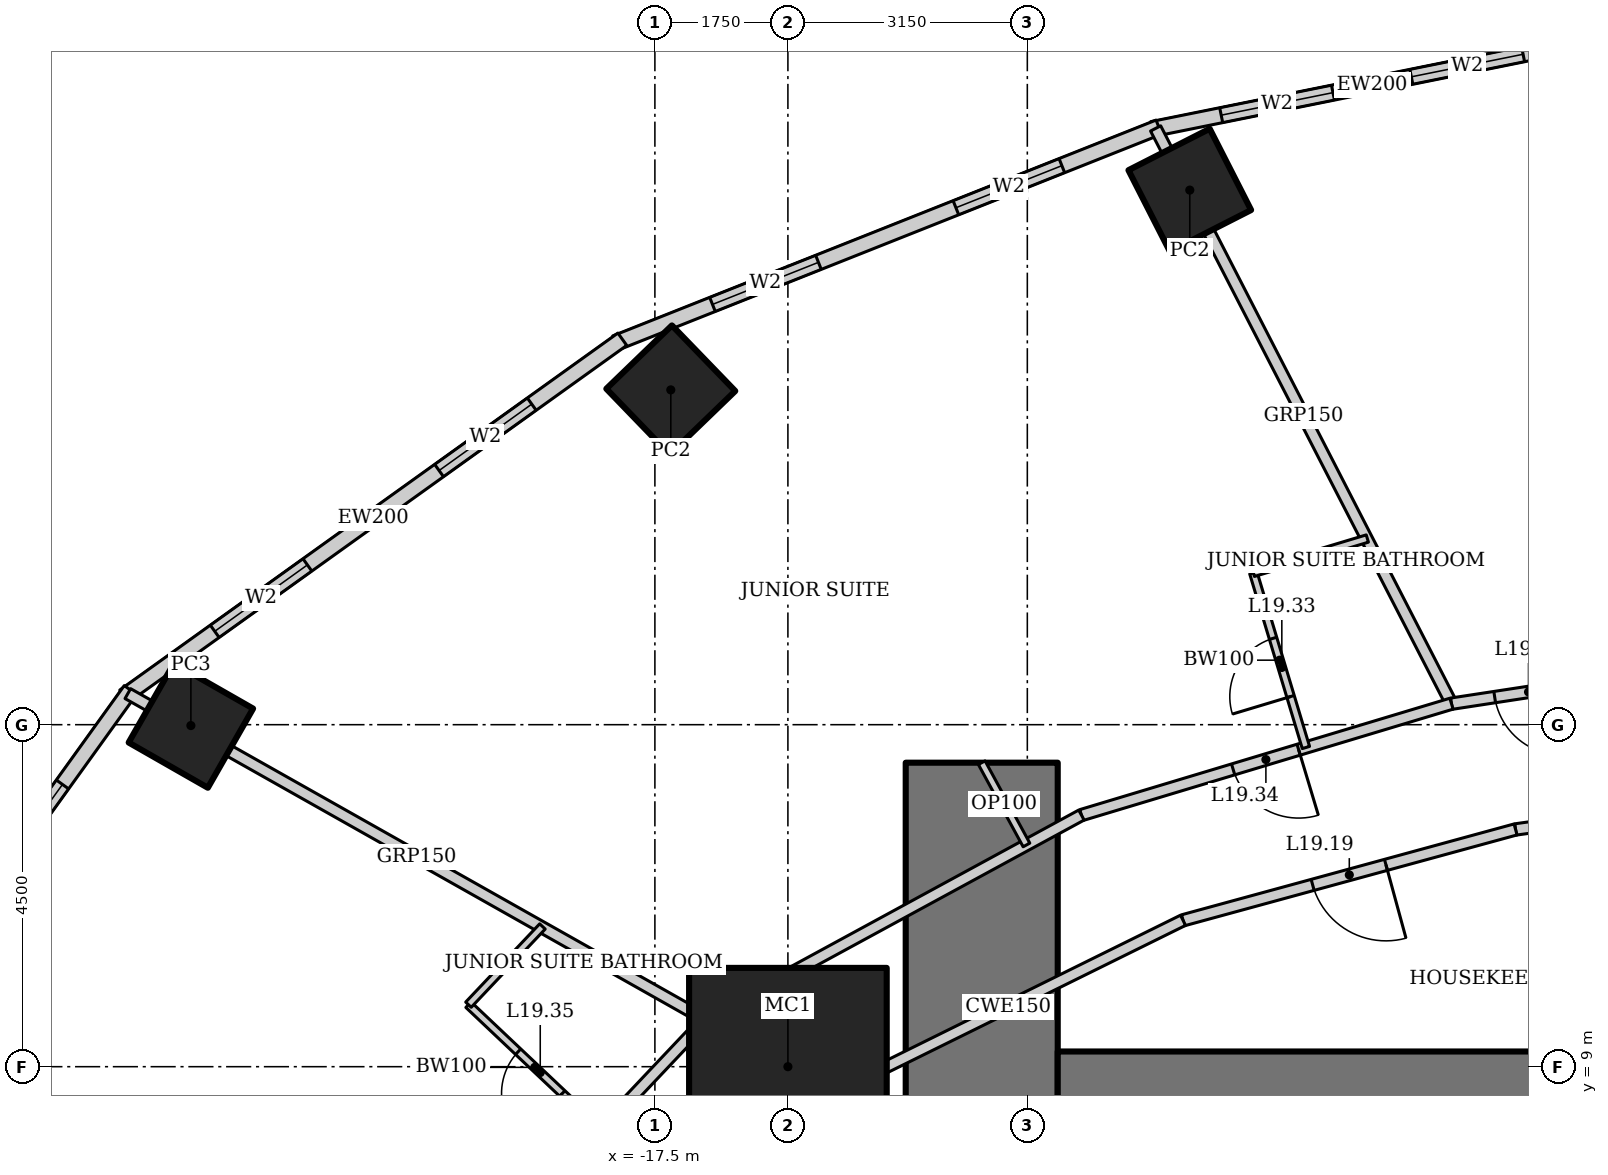
"""IFC4 building model, lengths in metres.
Left out: names, types, materials, properties, quantities, classifications, styles, units other than length and angle.
Written with IfcOpenShell. Run it as: python <this file> out.ifc"""

import sys

from ifc_helpers import new_model, si_unit, direction, frame, frame_2d, origin, origin_2d, place, context, subcontext, project, spatial, rectangle, hollow_rectangle, extrude, element, fill, save


model = new_model("IFC4")
c1 = context("Model", 3, precision=1e-05, world=origin(), true_north=direction((0.0, 1.0)))
c2 = subcontext(c1, "Body", "Model", "MODEL_VIEW")
j1 = project(units=[si_unit("LENGTHUNIT", "METRE"), si_unit("PLANEANGLEUNIT", "RADIAN")], contexts=[c1])
p1 = place(None, origin())
s1 = spatial("IfcSite", under=j1, at=p1, CompositionType="ELEMENT")
p2 = place(p1, origin())
s2 = spatial("IfcBuilding", under=s1, at=p2, CompositionType="ELEMENT")
p3 = place(p2, frame((0.0, 0.0, 83.8)))
s3 = spatial("IfcBuildingStorey", under=s2, at=p3, CompositionType="ELEMENT", Elevation=83.8)
p4 = place(p3, frame((-15.75, 9.0, 0.0), z_axis=(0.0, 0.0, 1.0), x_axis=(1.0, 0.0, 0.0)))
e1 = element("IfcColumn", 1, at=p4, inside=s3, PredefinedType="COLUMN", context=c2, shape_type="SweptSolid", body=[
    extrude(hollow_rectangle(XDim=2.6, YDim=2.6, WallThickness=0.13, at=origin_2d()), origin(), (0.0, 0.0, 1.0), 3.6),
])
for number, where, z_axis, x_axis in (
    (2, (-10.463, 20.534, 0.0), (0.0, 0.0, 1.0), (0.891, 0.454, 0.0)),
    (3, (-17.291, 17.905, 0.0), (0.0, 0.0, 1.0), (0.719, 0.695, 0.0)),
):
    element("IfcColumn", number, at=place(p3, frame(where, z_axis=z_axis, x_axis=x_axis)), inside=s3, PredefinedType="COLUMN", context=c2, shape_type="SweptSolid", body=[
        extrude(hollow_rectangle(XDim=1.2, YDim=1.2, WallThickness=0.1, at=origin_2d()), origin(), (0.0, 0.0, 1.0), 3.6),
    ])
p5 = place(p3, frame((-23.605, 13.489, 0.0), z_axis=(0.0, 0.0, 1.0), x_axis=(0.496139221777, 0.86824298017, 0.0)))
e4 = element("IfcColumn", 4, at=p5, inside=s3, PredefinedType="COLUMN", context=c2, shape_type="SweptSolid", body=[
    extrude(hollow_rectangle(XDim=1.2, YDim=1.2, WallThickness=0.12, at=origin_2d()), origin(), (0.0, 0.0, 1.0), 3.6),
])
p6 = place(p3, frame((-13.2, 13.0, 0.0), z_axis=(0.0, 0.0, 1.0), x_axis=(0.0, -1.0, 0.0)))
e5 = element("IfcWall", 5, at=p6, inside=s3, PredefinedType="SHEAR", context=c2, shape_type="SweptSolid", body=[
    extrude(rectangle(XDim=26.0, YDim=2.0, at=frame_2d((13.0, 0.0))), origin(), (0.0, 0.0, 1.0), 3.6),
])
p7 = place(p6, frame((12.1, 0.0, 0.0)))
e6 = element("IfcOpeningElement", 6, at=p7, cuts=e5, PredefinedType="OPENING", context=c2, shape_type="SweptSolid", body=[
    extrude(rectangle(XDim=1.8, YDim=2.1, at=frame_2d((0.9, 1.05))), frame((0.0, 1.01, 0.0), z_axis=(0.0, -1.0, 0.0), x_axis=(1.0, 0.0, 0.0)), (0.0, 0.0, 1.0), 2.02),
])
p8 = place(p3, frame((12.2, 8.0, 0.0), z_axis=(0.0, 0.0, 1.0), x_axis=(-1.0, 0.0, 0.0)))
e7 = element("IfcWall", 7, at=p8, inside=s3, PredefinedType="SHEAR", context=c2, shape_type="SweptSolid", body=[
    extrude(rectangle(XDim=24.4, YDim=2.4, at=frame_2d((12.2, 0.0))), origin(), (0.0, 0.0, 1.0), 3.6),
])
p9 = place(p3, frame((-5.17, 22.504, 0.0), z_axis=(0.0, 0.0, 1.0), x_axis=(-0.980251657452, -0.197754110105, 0.0)))
e8 = element("IfcWall", 8, at=p9, inside=s3, PredefinedType="SOLIDWALL", context=c2, shape_type="SweptSolid", body=[
    extrude(rectangle(XDim=5.904, YDim=0.2, at=frame_2d((2.952, 0.0))), origin(), (0.0, 0.0, 1.0), 3.45),
])
p10 = place(p9, frame((0.926, 0.0, 0.5)))
e9 = element("IfcOpeningElement", 9, at=p10, cuts=e8, PredefinedType="OPENING", context=c2, shape_type="SweptSolid", body=[
    extrude(rectangle(XDim=1.5, YDim=2.2, at=frame_2d((0.75, 1.1))), frame((0.0, 0.11, 0.0), z_axis=(0.0, -1.0, 0.0), x_axis=(1.0, 0.0, 0.0)), (0.0, 0.0, 1.0), 0.22),
])
p11 = place(p9, frame((3.478, 0.0, 0.5)))
e10 = element("IfcOpeningElement", 10, at=p11, cuts=e8, PredefinedType="OPENING", context=c2, shape_type="SweptSolid", body=[
    extrude(rectangle(XDim=1.5, YDim=2.2, at=frame_2d((0.75, 1.1))), frame((0.0, 0.11, 0.0), z_axis=(0.0, -1.0, 0.0), x_axis=(1.0, 0.0, 0.0)), (0.0, 0.0, 1.0), 0.22),
])
p12 = place(p3, frame((-10.869, 21.363, 0.0), z_axis=(0.0, 0.0, 1.0), x_axis=(-0.929358351251, -0.369178892895, 0.0)))
e11 = element("IfcWall", 11, at=p12, inside=s3, PredefinedType="SOLIDWALL", context=c2, shape_type="SweptSolid", body=[
    extrude(rectangle(XDim=7.692, YDim=0.2, at=frame_2d((3.846, 0.0))), origin(), (0.0, 0.0, 1.0), 3.45),
])
p13 = place(p12, frame((1.373, 0.0, 0.5)))
e12 = element("IfcOpeningElement", 12, at=p13, cuts=e11, PredefinedType="OPENING", context=c2, shape_type="SweptSolid", body=[
    extrude(rectangle(XDim=1.5, YDim=2.2, at=frame_2d((0.75, 1.1))), frame((0.0, 0.11, 0.0), z_axis=(0.0, -1.0, 0.0), x_axis=(1.0, 0.0, 0.0)), (0.0, 0.0, 1.0), 0.22),
])
p14 = place(p12, frame((4.819, 0.0, 0.5)))
e13 = element("IfcOpeningElement", 13, at=p14, cuts=e11, PredefinedType="OPENING", context=c2, shape_type="SweptSolid", body=[
    extrude(rectangle(XDim=1.5, YDim=2.2, at=frame_2d((0.75, 1.1))), frame((0.0, 0.11, 0.0), z_axis=(0.0, -1.0, 0.0), x_axis=(1.0, 0.0, 0.0)), (0.0, 0.0, 1.0), 0.22),
])
p15 = place(p3, frame((-17.929, 18.572, 0.0), z_axis=(0.0, 0.0, 1.0), x_axis=(-0.812791321576, -0.582554948112, 0.0)))
e14 = element("IfcWall", 14, at=p15, inside=s3, PredefinedType="SOLIDWALL", context=c2, shape_type="SweptSolid", body=[
    extrude(rectangle(XDim=8.063, YDim=0.2, at=frame_2d((4.032, 0.0))), origin(), (0.0, 0.0, 1.0), 3.45),
])
p16 = place(p15, frame((1.466, 0.0, 0.5)))
e15 = element("IfcOpeningElement", 15, at=p16, cuts=e14, PredefinedType="OPENING", context=c2, shape_type="SweptSolid", body=[
    extrude(rectangle(XDim=1.5, YDim=2.2, at=frame_2d((0.75, 1.1))), frame((0.0, 0.11, 0.0), z_axis=(0.0, -1.0, 0.0), x_axis=(1.0, 0.0, 0.0)), (0.0, 0.0, 1.0), 0.22),
])
p17 = place(p15, frame((5.097, 0.0, 0.5)))
e16 = element("IfcOpeningElement", 16, at=p17, cuts=e14, PredefinedType="OPENING", context=c2, shape_type="SweptSolid", body=[
    extrude(rectangle(XDim=1.5, YDim=2.2, at=frame_2d((0.75, 1.1))), frame((0.0, 0.11, 0.0), z_axis=(0.0, -1.0, 0.0), x_axis=(1.0, 0.0, 0.0)), (0.0, 0.0, 1.0), 0.22),
])
p18 = place(p3, frame((-24.4, 13.957, 0.0), z_axis=(0.0, 0.0, 1.0), x_axis=(-0.583937613703, -0.811798536155, 0.0)))
e17 = element("IfcWall", 17, at=p18, inside=s3, PredefinedType="SOLIDWALL", context=c2, shape_type="SweptSolid", body=[
    extrude(rectangle(XDim=8.323, YDim=0.2, at=frame_2d((4.162, 0.0))), origin(), (0.0, 0.0, 1.0), 3.45),
])
p19 = place(p18, frame((1.531, 0.0, 0.5)))
e18 = element("IfcOpeningElement", 18, at=p19, cuts=e17, PredefinedType="OPENING", context=c2, shape_type="SweptSolid", body=[
    extrude(rectangle(XDim=1.5, YDim=2.2, at=frame_2d((0.75, 1.1))), frame((0.0, 0.11, 0.0), z_axis=(0.0, -1.0, 0.0), x_axis=(1.0, 0.0, 0.0)), (0.0, 0.0, 1.0), 0.22),
])
p20 = place(p18, frame((5.292, 0.0, 0.5)))
e19 = element("IfcOpeningElement", 19, at=p20, cuts=e17, PredefinedType="OPENING", context=c2, shape_type="SweptSolid", body=[
    extrude(rectangle(XDim=1.5, YDim=2.2, at=frame_2d((0.75, 1.1))), frame((0.0, 0.11, 0.0), z_axis=(0.0, -1.0, 0.0), x_axis=(1.0, 0.0, 0.0)), (0.0, 0.0, 1.0), 0.22),
])
p21 = place(p3, frame((-10.912, 21.346, 0.0), z_axis=(0.0, 0.0, 1.0), x_axis=(0.457327273085, -0.889298468059, 0.0)))
e20 = element("IfcWall", 20, at=p21, inside=s3, PredefinedType="PARTITIONING", context=c2, shape_type="SweptSolid", body=[
    extrude(rectangle(XDim=8.511, YDim=0.15, at=frame_2d((4.256, 0.0))), origin(), (0.0, 0.0, 1.0), 2.528),
])
p22 = place(p3, frame((-24.435, 13.909, 0.0), z_axis=(0.0, 0.0, 1.0), x_axis=(0.87090601027, -0.491449612143, 0.0)))
e21 = element("IfcWall", 21, at=p22, inside=s3, PredefinedType="PARTITIONING", context=c2, shape_type="SweptSolid", body=[
    extrude(rectangle(XDim=8.726, YDim=0.15, at=frame_2d((4.363, 0.0))), origin(), (0.0, 0.0, 1.0), 2.693),
])
p23 = place(p3, frame((-3.311, 14.342, 0.0), z_axis=(0.0, 0.0, 1.0), x_axis=(-0.988564270062, -0.150800145746, 0.0)))
e22 = element("IfcWall", 22, at=p23, inside=s3, PredefinedType="PARTITIONING", context=c2, shape_type="SweptSolid", body=[
    extrude(rectangle(XDim=3.751, YDim=0.15, at=frame_2d((1.875, 0.0))), origin(), (0.0, 0.0, 1.0), 3.45),
])
p24 = place(p23, frame((2.276, 0.0, 0.0)))
e23 = element("IfcOpeningElement", 23, at=p24, cuts=e22, PredefinedType="OPENING", context=c2, shape_type="SweptSolid", body=[
    extrude(rectangle(XDim=0.9, YDim=2.1, at=frame_2d((0.45, 1.05))), frame((0.0, 0.085, 0.0), z_axis=(0.0, -1.0, 0.0), x_axis=(1.0, 0.0, 0.0)), (0.0, 0.0, 1.0), 0.17),
])
p25 = place(p3, frame((-7.019, 13.776, 0.0), z_axis=(0.0, 0.0, 1.0), x_axis=(-0.957564241242, -0.288219922793, 0.0)))
e24 = element("IfcWall", 24, at=p25, inside=s3, PredefinedType="PARTITIONING", context=c2, shape_type="SweptSolid", body=[
    extrude(rectangle(XDim=5.085, YDim=0.15, at=frame_2d((2.542, 0.0))), origin(), (0.0, 0.0, 1.0), 3.45),
])
p26 = place(p25, frame((2.1, 0.0, 0.0)))
e25 = element("IfcOpeningElement", 25, at=p26, cuts=e24, PredefinedType="OPENING", context=c2, shape_type="SweptSolid", body=[
    extrude(rectangle(XDim=0.9, YDim=2.1, at=frame_2d((0.45, 1.05))), frame((0.0, 0.085, 0.0), z_axis=(0.0, -1.0, 0.0), x_axis=(1.0, 0.0, 0.0)), (0.0, 0.0, 1.0), 0.17),
])
p27 = place(p3, frame((-11.888, 12.311, 0.0), z_axis=(0.0, 0.0, 1.0), x_axis=(-0.878450059298, -0.477834169267, 0.0)))
e26 = element("IfcWall", 26, at=p27, inside=s3, PredefinedType="PARTITIONING", context=c2, shape_type="SweptSolid", body=[
    extrude(rectangle(XDim=5.631, YDim=0.15, at=frame_2d((2.815, 0.0))), origin(), (0.0, 0.0, 1.0), 3.45),
])
p28 = place(p3, frame((-16.835, 9.62, 0.0), z_axis=(0.0, 0.0, 1.0), x_axis=(-0.687062608696, -0.726598218916, 0.0)))
e27 = element("IfcWall", 27, at=p28, inside=s3, PredefinedType="PARTITIONING", context=c2, shape_type="SweptSolid", body=[
    extrude(rectangle(XDim=6.039, YDim=0.15, at=frame_2d((3.02, 0.0))), origin(), (0.0, 0.0, 1.0), 3.45),
])
p29 = place(p3, frame((-2.903, 12.574, 0.0), z_axis=(0.0, 0.0, 1.0), x_axis=(-0.990563451353, -0.137054911782, 0.0)))
e28 = element("IfcWall", 28, at=p29, inside=s3, PredefinedType="PARTITIONING", context=c2, shape_type="SweptSolid", body=[
    extrude(rectangle(XDim=3.304, YDim=0.15, at=frame_2d((1.652, 0.0))), origin(), (0.0, 0.0, 1.0), 3.45),
])
p30 = place(p29, frame((0.1, 0.0, 0.0)))
e29 = element("IfcOpeningElement", 29, at=p30, cuts=e28, PredefinedType="OPENING", context=c2, shape_type="SweptSolid", body=[
    extrude(rectangle(XDim=1.0, YDim=2.1, at=frame_2d((0.5, 1.05))), frame((0.0, 0.085, 0.0), z_axis=(0.0, -1.0, 0.0), x_axis=(1.0, 0.0, 0.0)), (0.0, 0.0, 1.0), 0.17),
])
p31 = place(p3, frame((-6.176, 12.122, 0.0), z_axis=(0.0, 0.0, 1.0), x_axis=(-0.964644466646, -0.263554648923, 0.0)))
e30 = element("IfcWall", 30, at=p31, inside=s3, PredefinedType="PARTITIONING", context=c2, shape_type="SweptSolid", body=[
    extrude(rectangle(XDim=4.535, YDim=0.15, at=frame_2d((2.268, 0.0))), origin(), (0.0, 0.0, 1.0), 3.45),
])
p32 = place(p31, frame((1.768, 0.0, 0.0)))
e31 = element("IfcOpeningElement", 31, at=p32, cuts=e30, PredefinedType="OPENING", context=c2, shape_type="SweptSolid", body=[
    extrude(rectangle(XDim=1.0, YDim=2.1, at=frame_2d((0.5, 1.05))), frame((0.0, 0.085, 0.0), z_axis=(0.0, -1.0, 0.0), x_axis=(1.0, 0.0, 0.0)), (0.0, 0.0, 1.0), 0.17),
])
p33 = place(p3, frame((-10.551, 10.926, 0.0), z_axis=(0.0, 0.0, 1.0), x_axis=(-0.89656943448, -0.442903205177, 0.0)))
e32 = element("IfcWall", 32, at=p33, inside=s3, PredefinedType="PARTITIONING", context=c2, shape_type="SweptSolid", body=[
    extrude(rectangle(XDim=5.126, YDim=0.15, at=frame_2d((2.563, 0.0))), origin(), (0.0, 0.0, 1.0), 3.45),
])
p34 = place(p3, frame((-15.147, 8.656, 0.0), z_axis=(0.0, 0.0, 1.0), x_axis=(-0.720837261072, -0.693104352209, 0.0)))
e33 = element("IfcWall", 33, at=p34, inside=s3, PredefinedType="PARTITIONING", context=c2, shape_type="SweptSolid", body=[
    extrude(rectangle(XDim=5.59, YDim=0.15, at=frame_2d((2.795, 0.0))), origin(), (0.0, 0.0, 1.0), 3.45),
])
p35 = place(p34, frame((2.295, 0.0, 0.0)))
e34 = element("IfcOpeningElement", 34, at=p35, cuts=e33, PredefinedType="OPENING", context=c2, shape_type="SweptSolid", body=[
    extrude(rectangle(XDim=1.0, YDim=2.1, at=frame_2d((0.5, 1.05))), frame((0.0, 0.085, 0.0), z_axis=(0.0, -1.0, 0.0), x_axis=(1.0, 0.0, 0.0)), (0.0, 0.0, 1.0), 0.17),
])
p36 = place(p3, frame((-8.935, 13.2, 0.0), z_axis=(0.0, 0.0, 1.0), x_axis=(-0.288197066254, 0.957571120598, 0.0)))
e35 = element("IfcWall", 35, at=p36, inside=s3, PredefinedType="PARTITIONING", context=c2, shape_type="SweptSolid", body=[
    extrude(rectangle(XDim=2.4, YDim=0.1, at=frame_2d((1.2, 0.0))), origin(), (0.0, 0.0, 1.0), 3.45),
])
p37 = place(p36, frame((0.7, 0.0, 0.0)))
e36 = element("IfcOpeningElement", 36, at=p37, cuts=e35, PredefinedType="OPENING", context=c2, shape_type="SweptSolid", body=[
    extrude(rectangle(XDim=0.8, YDim=2.1, at=frame_2d((0.4, 1.05))), frame((0.0, 0.06, 0.0), z_axis=(0.0, -1.0, 0.0), x_axis=(1.0, 0.0, 0.0)), (0.0, 0.0, 1.0), 0.12),
])
p38 = place(p3, frame((-9.626, 15.498, 0.0), z_axis=(0.0, 0.0, 1.0), x_axis=(0.957551231109, 0.288263143328, 0.0)))
e37 = element("IfcWall", 37, at=p38, inside=s3, PredefinedType="PARTITIONING", context=c2, shape_type="SweptSolid", body=[
    extrude(rectangle(XDim=1.566, YDim=0.1, at=frame_2d((0.783, 0.0))), origin(), (0.0, 0.0, 1.0), 3.45),
])
p39 = place(p3, frame((-18.209, 8.167, 0.0), z_axis=(0.0, 0.0, 1.0), x_axis=(-0.726567238928, 0.687095369885, 0.0)))
e38 = element("IfcWall", 38, at=p39, inside=s3, PredefinedType="PARTITIONING", context=c2, shape_type="SweptSolid", body=[
    extrude(rectangle(XDim=2.4, YDim=0.1, at=frame_2d((1.2, 0.0))), origin(), (0.0, 0.0, 1.0), 3.45),
])
p40 = place(p39, frame((0.7, 0.0, 0.0)))
e39 = element("IfcOpeningElement", 39, at=p40, cuts=e38, PredefinedType="OPENING", context=c2, shape_type="SweptSolid", body=[
    extrude(rectangle(XDim=0.8, YDim=2.1, at=frame_2d((0.4, 1.05))), frame((0.0, 0.06, 0.0), z_axis=(0.0, -1.0, 0.0), x_axis=(1.0, 0.0, 0.0)), (0.0, 0.0, 1.0), 0.12),
])
p41 = place(p3, frame((-19.953, 9.816, 0.0), z_axis=(0.0, 0.0, 1.0), x_axis=(0.687017997787, 0.726640399866, 0.0)))
e40 = element("IfcWall", 40, at=p41, inside=s3, PredefinedType="PARTITIONING", context=c2, shape_type="SweptSolid", body=[
    extrude(rectangle(XDim=1.417, YDim=0.1, at=frame_2d((0.708, 0.0))), origin(), (0.0, 0.0, 1.0), 3.45),
])
p42 = place(p3, frame((-13.2, 13.0, 0.0), z_axis=(0.0, 0.0, 1.0), x_axis=(0.477852414256, -0.878440134665, 0.0)))
e41 = element("IfcWall", 41, at=p42, inside=s3, PredefinedType="PARTITIONING", context=c2, shape_type="SweptSolid", body=[
    extrude(rectangle(XDim=1.232, YDim=0.1, at=frame_2d((0.616, 0.0))), origin(), (0.0, 0.0, 1.0), 3.45),
])
p43 = place(p10, origin())
e42 = element("IfcWindow", 42, at=p43, inside=s3, PartitioningType="SINGLE_PANEL", PredefinedType="WINDOW", context=c2, shape_type="SweptSolid", body=[
    extrude(rectangle(XDim=1.5, YDim=2.2, at=frame_2d((0.75, 1.1))), frame((0.0, 0.03, 0.0), z_axis=(0.0, -1.0, 0.0), x_axis=(1.0, 0.0, 0.0)), (0.0, 0.0, 1.0), 0.06),
])
fill(e9, e42)
p44 = place(p11, origin())
e43 = element("IfcWindow", 43, at=p44, inside=s3, PartitioningType="SINGLE_PANEL", PredefinedType="WINDOW", context=c2, shape_type="SweptSolid", body=[
    extrude(rectangle(XDim=1.5, YDim=2.2, at=frame_2d((0.75, 1.1))), frame((0.0, 0.03, 0.0), z_axis=(0.0, -1.0, 0.0), x_axis=(1.0, 0.0, 0.0)), (0.0, 0.0, 1.0), 0.06),
])
fill(e10, e43)
p45 = place(p13, origin())
e44 = element("IfcWindow", 44, at=p45, inside=s3, PartitioningType="SINGLE_PANEL", PredefinedType="WINDOW", context=c2, shape_type="SweptSolid", body=[
    extrude(rectangle(XDim=1.5, YDim=2.2, at=frame_2d((0.75, 1.1))), frame((0.0, 0.03, 0.0), z_axis=(0.0, -1.0, 0.0), x_axis=(1.0, 0.0, 0.0)), (0.0, 0.0, 1.0), 0.06),
])
fill(e12, e44)
p46 = place(p14, origin())
e45 = element("IfcWindow", 45, at=p46, inside=s3, PartitioningType="SINGLE_PANEL", PredefinedType="WINDOW", context=c2, shape_type="SweptSolid", body=[
    extrude(rectangle(XDim=1.5, YDim=2.2, at=frame_2d((0.75, 1.1))), frame((0.0, 0.03, 0.0), z_axis=(0.0, -1.0, 0.0), x_axis=(1.0, 0.0, 0.0)), (0.0, 0.0, 1.0), 0.06),
])
fill(e13, e45)
p47 = place(p16, origin())
e46 = element("IfcWindow", 46, at=p47, inside=s3, PartitioningType="SINGLE_PANEL", PredefinedType="WINDOW", context=c2, shape_type="SweptSolid", body=[
    extrude(rectangle(XDim=1.5, YDim=2.2, at=frame_2d((0.75, 1.1))), frame((0.0, 0.03, 0.0), z_axis=(0.0, -1.0, 0.0), x_axis=(1.0, 0.0, 0.0)), (0.0, 0.0, 1.0), 0.06),
])
fill(e15, e46)
p48 = place(p17, origin())
e47 = element("IfcWindow", 47, at=p48, inside=s3, PartitioningType="SINGLE_PANEL", PredefinedType="WINDOW", context=c2, shape_type="SweptSolid", body=[
    extrude(rectangle(XDim=1.5, YDim=2.2, at=frame_2d((0.75, 1.1))), frame((0.0, 0.03, 0.0), z_axis=(0.0, -1.0, 0.0), x_axis=(1.0, 0.0, 0.0)), (0.0, 0.0, 1.0), 0.06),
])
fill(e16, e47)
p49 = place(p19, origin())
e48 = element("IfcWindow", 48, at=p49, inside=s3, PartitioningType="SINGLE_PANEL", PredefinedType="WINDOW", context=c2, shape_type="SweptSolid", body=[
    extrude(rectangle(XDim=1.5, YDim=2.2, at=frame_2d((0.75, 1.1))), frame((0.0, 0.03, 0.0), z_axis=(0.0, -1.0, 0.0), x_axis=(1.0, 0.0, 0.0)), (0.0, 0.0, 1.0), 0.06),
])
fill(e18, e48)
p50 = place(p32, origin())
e49 = element("IfcDoor", 49, at=p50, inside=s3, OperationType="SINGLE_SWING_LEFT", PredefinedType="DOOR", context=c2, shape_type="SweptSolid", body=[
    extrude(rectangle(XDim=1.0, YDim=2.1, at=frame_2d((0.5, 1.05))), frame((0.0, 0.025, 0.0), z_axis=(0.0, -1.0, 0.0), x_axis=(1.0, 0.0, 0.0)), (0.0, 0.0, 1.0), 0.05),
])
fill(e31, e49)
p51 = place(p24, origin())
e50 = element("IfcDoor", 50, at=p51, inside=s3, OperationType="SINGLE_SWING_LEFT", PredefinedType="DOOR", context=c2, shape_type="SweptSolid", body=[
    extrude(rectangle(XDim=0.9, YDim=2.1, at=frame_2d((0.45, 1.05))), frame((0.0, 0.025, 0.0), z_axis=(0.0, -1.0, 0.0), x_axis=(1.0, 0.0, 0.0)), (0.0, 0.0, 1.0), 0.05),
])
fill(e23, e50)
p52 = place(p37, origin())
e51 = element("IfcDoor", 51, at=p52, inside=s3, OperationType="SINGLE_SWING_LEFT", PredefinedType="DOOR", context=c2, shape_type="SweptSolid", body=[
    extrude(rectangle(XDim=0.8, YDim=2.1, at=frame_2d((0.4, 1.05))), frame((0.0, 0.025, 0.0), z_axis=(0.0, -1.0, 0.0), x_axis=(1.0, 0.0, 0.0)), (0.0, 0.0, 1.0), 0.05),
])
fill(e36, e51)
p53 = place(p26, origin())
e52 = element("IfcDoor", 52, at=p53, inside=s3, OperationType="SINGLE_SWING_LEFT", PredefinedType="DOOR", context=c2, shape_type="SweptSolid", body=[
    extrude(rectangle(XDim=0.9, YDim=2.1, at=frame_2d((0.45, 1.05))), frame((0.0, 0.025, 0.0), z_axis=(0.0, -1.0, 0.0), x_axis=(1.0, 0.0, 0.0)), (0.0, 0.0, 1.0), 0.05),
])
fill(e25, e52)
p54 = place(p40, origin())
e53 = element("IfcDoor", 53, at=p54, inside=s3, OperationType="SINGLE_SWING_LEFT", PredefinedType="DOOR", context=c2, shape_type="SweptSolid", body=[
    extrude(rectangle(XDim=0.8, YDim=2.1, at=frame_2d((0.4, 1.05))), frame((0.0, 0.025, 0.0), z_axis=(0.0, -1.0, 0.0), x_axis=(1.0, 0.0, 0.0)), (0.0, 0.0, 1.0), 0.05),
])
fill(e39, e53)
save(model, sys.argv[1])
